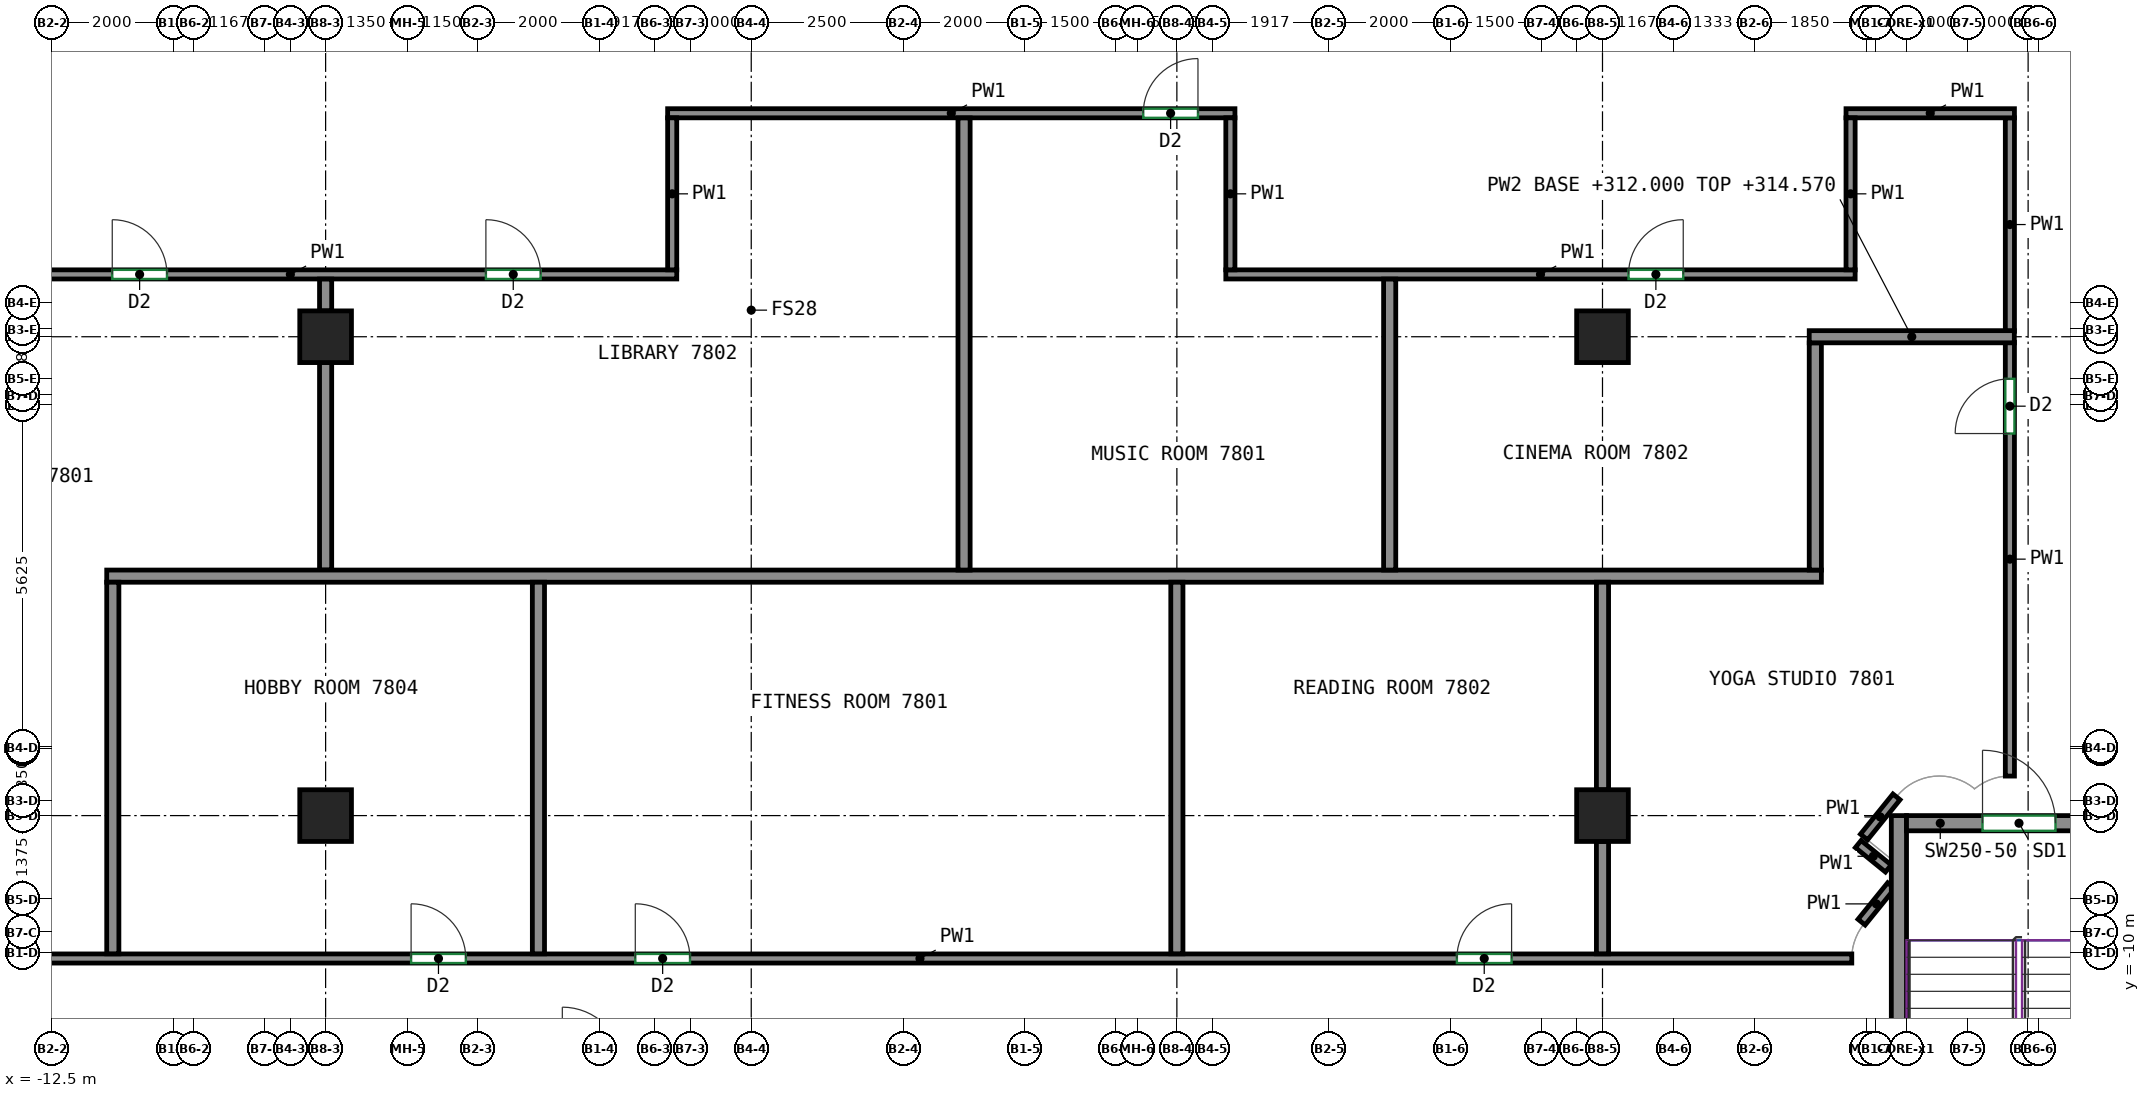
"""IFC4 building model, lengths in metres.
Left out: names, types, materials, properties, quantities, classifications, styles, units other than length and angle.
Written with IfcOpenShell. Run it as: python <this file> out.ifc"""

import sys

from ifc_helpers import new_model, si_unit, direction, frame, frame_2d, origin, origin_2d, place, context, subcontext, project, spatial, rectangle, extrude, source, transform, mapped, element, fill, save


model = new_model("IFC4")
c1 = context("Model", 3, precision=1e-05, world=origin(), true_north=direction((0.0, 1.0)))
c2 = subcontext(c1, "Body", "Model", "MODEL_VIEW")
j1 = project(units=[si_unit("LENGTHUNIT", "METRE"), si_unit("PLANEANGLEUNIT", "RADIAN")], contexts=[c1])
p1 = place(None, origin())
s1 = spatial("IfcSite", under=j1, at=p1, CompositionType="ELEMENT")
p2 = place(p1, origin())
s2 = spatial("IfcBuilding", under=s1, at=p2, CompositionType="ELEMENT")
p3 = place(p2, frame((0.0, 0.0, 312.0)))
s3 = spatial("IfcBuildingStorey", under=s2, at=p3, CompositionType="ELEMENT", Elevation=312.0)
m1 = source(origin(), c2, "Body", "SweptSolid", [
    extrude(rectangle(XDim=0.85, YDim=0.85, at=origin_2d()), origin(), (0.0, 0.0, 1.0), 3.12),
])
for number, where, z_axis, x_axis in (
    (1, (-8.0, -7.75, 0.0), (0.0, 0.0, 1.0), (1.0, 0.0, 0.0)),
    (2, (-8.0, 0.125, 0.0), (0.0, 0.0, 1.0), (1.0, 0.0, 0.0)),
    (3, (13.0, -7.75, 0.0), (0.0, 0.0, 1.0), (1.0, 0.0, 0.0)),
    (4, (13.0, 0.125, 0.0), (0.0, 0.0, 1.0), (1.0, 0.0, 0.0)),
):
    element("IfcColumn", number, at=place(p3, frame(where, z_axis=z_axis, x_axis=x_axis)), inside=s3, PredefinedType="COLUMN", context=c2, shape_type="MappedRepresentation", body=[
        mapped(m1, transform((0.0, 0.0, 0.0))),
    ])
m2 = source(origin(), c2, "Body", "SweptSolid", [
    extrude(rectangle(XDim=8.0, YDim=0.25, at=frame_2d((4.0, 0.0))), origin(), (0.0, 0.0, 1.0), 3.12),
])
p4 = place(p3, frame((17.875, -15.75, 0.0), z_axis=(0.0, 0.0, 1.0), x_axis=(0.0, 1.0, 0.0)))
e5 = element("IfcWall", 5, at=p4, inside=s3, PredefinedType="SHEAR", context=c2, shape_type="MappedRepresentation", body=[
    mapped(m2, transform((0.0, 0.0, 0.0))),
])
m3 = source(origin(), c2, "Body", "SweptSolid", [
    extrude(rectangle(XDim=3.7, YDim=0.25, at=frame_2d((1.85, 0.0))), origin(), (0.0, 0.0, 1.0), 3.12),
])
p5 = place(p3, frame((18.0, -7.875, 0.0), z_axis=(0.0, 0.0, 1.0), x_axis=(1.0, 0.0, 0.0)))
e6 = element("IfcWall", 6, at=p5, inside=s3, PredefinedType="SHEAR", context=c2, shape_type="MappedRepresentation", body=[
    mapped(m3, transform((0.0, 0.0, 0.0))),
])
p6 = place(p5, frame((1.25, 0.0, 0.0)))
e7 = element("IfcOpeningElement", 7, at=p6, cuts=e6, PredefinedType="OPENING", context=c2, shape_type="SweptSolid", body=[
    extrude(rectangle(XDim=1.2, YDim=2.1, at=frame_2d((0.6, 1.05))), frame((0.0, 0.135, 0.0), z_axis=(0.0, -1.0, 0.0), x_axis=(1.0, 0.0, 0.0)), (0.0, 0.0, 1.0), 0.27),
])
p7 = place(p3, frame((-14.935, 1.15, 0.0), z_axis=(0.0, 0.0, 1.0), x_axis=(1.0, 0.0, 0.0)))
e8 = element("IfcWall", 8, at=p7, inside=s3, PredefinedType="PARTITIONING", context=c2, shape_type="SweptSolid", body=[
    extrude(rectangle(XDim=12.71, YDim=0.15, at=frame_2d((6.355, 0.0))), origin(), (0.0, 0.0, 1.0), 3.12),
])
p8 = place(p7, frame((3.426, 0.0, 0.0)))
e9 = element("IfcOpeningElement", 9, at=p8, cuts=e8, PredefinedType="OPENING", context=c2, shape_type="SweptSolid", body=[
    extrude(rectangle(XDim=0.9, YDim=2.1, at=frame_2d((0.45, 1.05))), frame((0.0, 0.085, 0.0), z_axis=(0.0, -1.0, 0.0), x_axis=(1.0, 0.0, 0.0)), (0.0, 0.0, 1.0), 0.17),
])
p9 = place(p7, frame((9.571, 0.0, 0.0)))
e10 = element("IfcOpeningElement", 10, at=p9, cuts=e8, PredefinedType="OPENING", context=c2, shape_type="SweptSolid", body=[
    extrude(rectangle(XDim=0.9, YDim=2.1, at=frame_2d((0.45, 1.05))), frame((0.0, 0.085, 0.0), z_axis=(0.0, -1.0, 0.0), x_axis=(1.0, 0.0, 0.0)), (0.0, 0.0, 1.0), 0.17),
])
p10 = place(p3, frame((-13.55, -10.1, 0.0), z_axis=(0.0, 0.0, 1.0), x_axis=(1.0, 0.0, 0.0)))
e11 = element("IfcWall", 11, at=p10, inside=s3, PredefinedType="PARTITIONING", context=c2, shape_type="SweptSolid", body=[
    extrude(rectangle(XDim=30.65, YDim=0.15, at=frame_2d((15.325, 0.0))), origin(), (0.0, 0.0, 1.0), 3.12),
])
p11 = place(p10, frame((6.956, 0.0, 0.0)))
e12 = element("IfcOpeningElement", 12, at=p11, cuts=e11, PredefinedType="OPENING", context=c2, shape_type="SweptSolid", body=[
    extrude(rectangle(XDim=0.9, YDim=2.1, at=frame_2d((0.45, 1.05))), frame((0.0, 0.085, 0.0), z_axis=(0.0, -1.0, 0.0), x_axis=(1.0, 0.0, 0.0)), (0.0, 0.0, 1.0), 0.17),
])
p12 = place(p10, frame((10.643, 0.0, 0.0)))
e13 = element("IfcOpeningElement", 13, at=p12, cuts=e11, PredefinedType="OPENING", context=c2, shape_type="SweptSolid", body=[
    extrude(rectangle(XDim=0.9, YDim=2.1, at=frame_2d((0.45, 1.05))), frame((0.0, 0.085, 0.0), z_axis=(0.0, -1.0, 0.0), x_axis=(1.0, 0.0, 0.0)), (0.0, 0.0, 1.0), 0.17),
])
p13 = place(p10, frame((24.155, 0.0, 0.0)))
e14 = element("IfcOpeningElement", 14, at=p13, cuts=e11, PredefinedType="OPENING", context=c2, shape_type="SweptSolid", body=[
    extrude(rectangle(XDim=0.9, YDim=2.1, at=frame_2d((0.45, 1.05))), frame((0.0, 0.085, 0.0), z_axis=(0.0, -1.0, 0.0), x_axis=(1.0, 0.0, 0.0)), (0.0, 0.0, 1.0), 0.17),
])
p14 = place(p3, frame((-2.375, 3.8, 0.0), z_axis=(0.0, 0.0, 1.0), x_axis=(1.0, 0.0, 0.0)))
e15 = element("IfcWall", 15, at=p14, inside=s3, PredefinedType="PARTITIONING", context=c2, shape_type="SweptSolid", body=[
    extrude(rectangle(XDim=9.33, YDim=0.15, at=frame_2d((4.665, 0.0))), origin(), (0.0, 0.0, 1.0), 3.12),
])
p15 = place(p14, frame((7.822, 0.0, 0.0)))
e16 = element("IfcOpeningElement", 16, at=p15, cuts=e15, PredefinedType="OPENING", context=c2, shape_type="SweptSolid", body=[
    extrude(rectangle(XDim=0.9, YDim=2.1, at=frame_2d((0.45, 1.05))), frame((0.0, 0.085, 0.0), z_axis=(0.0, -1.0, 0.0), x_axis=(1.0, 0.0, 0.0)), (0.0, 0.0, 1.0), 0.17),
])
p16 = place(p3, frame((-2.3, 1.225, 0.0), z_axis=(0.0, 0.0, 1.0), x_axis=(0.0, 1.0, 0.0)))
e17 = element("IfcWall", 17, at=p16, inside=s3, PredefinedType="PARTITIONING", context=c2, shape_type="SweptSolid", body=[
    extrude(rectangle(XDim=2.5, YDim=0.15, at=frame_2d((1.25, 0.0))), origin(), (0.0, 0.0, 1.0), 3.12),
])
p17 = place(p3, frame((6.805, 1.15, 0.0), z_axis=(0.0, 0.0, 1.0), x_axis=(1.0, 0.0, 0.0)))
e18 = element("IfcWall", 18, at=p17, inside=s3, PredefinedType="PARTITIONING", context=c2, shape_type="SweptSolid", body=[
    extrude(rectangle(XDim=10.35, YDim=0.15, at=frame_2d((5.175, 0.0))), origin(), (0.0, 0.0, 1.0), 3.12),
])
p18 = place(p17, frame((6.623, 0.0, 0.0)))
e19 = element("IfcOpeningElement", 19, at=p18, cuts=e18, PredefinedType="OPENING", context=c2, shape_type="SweptSolid", body=[
    extrude(rectangle(XDim=0.9, YDim=2.1, at=frame_2d((0.45, 1.05))), frame((0.0, 0.085, 0.0), z_axis=(0.0, -1.0, 0.0), x_axis=(1.0, 0.0, 0.0)), (0.0, 0.0, 1.0), 0.17),
])
p19 = place(p3, frame((6.88, 3.725, 0.0), z_axis=(0.0, 0.0, 1.0), x_axis=(0.0, -1.0, 0.0)))
e20 = element("IfcWall", 20, at=p19, inside=s3, PredefinedType="PARTITIONING", context=c2, shape_type="SweptSolid", body=[
    extrude(rectangle(XDim=2.5, YDim=0.15, at=frame_2d((1.25, 0.0))), origin(), (0.0, 0.0, 1.0), 3.12),
])
p20 = place(p3, frame((17.748, -8.902, 0.0), z_axis=(0.0, 0.0, 1.0), x_axis=(-0.630342797145, -0.776316918589, 0.0)))
e21 = element("IfcWall", 21, at=p20, inside=s3, PredefinedType="PARTITIONING", context=c2, shape_type="SweptSolid", body=[
    extrude(rectangle(XDim=0.773, YDim=0.15, at=frame_2d((0.386, 0.0))), origin(), (0.0, 0.0, 1.0), 3.12),
])
p21 = place(p3, frame((17.206, -8.218, 0.0), z_axis=(0.0, 0.0, 1.0), x_axis=(0.776102288291, -0.630607039376, 0.0)))
e22 = element("IfcWall", 22, at=p21, inside=s3, PredefinedType="PARTITIONING", context=c2, shape_type="SweptSolid", body=[
    extrude(rectangle(XDim=0.638, YDim=0.15, at=frame_2d((0.319, 0.0))), origin(), (0.0, 0.0, 1.0), 3.12),
])
p22 = place(p3, frame((17.835, -7.442, 0.0), z_axis=(0.0, 0.0, 1.0), x_axis=(-0.628859024249, -0.777519342281, 0.0)))
e23 = element("IfcWall", 23, at=p22, inside=s3, PredefinedType="PARTITIONING", context=c2, shape_type="SweptSolid", body=[
    extrude(rectangle(XDim=0.849, YDim=0.15, at=frame_2d((0.425, 0.0))), origin(), (0.0, 0.0, 1.0), 3.12),
])
p23 = place(p3, frame((19.7, -7.1, 0.0), z_axis=(0.0, 0.0, 1.0), x_axis=(0.0, 1.0, 0.0)))
e24 = element("IfcWall", 24, at=p23, inside=s3, PredefinedType="PARTITIONING", context=c2, shape_type="SweptSolid", body=[
    extrude(rectangle(XDim=7.135, YDim=0.15, at=frame_2d((3.567, 0.0))), origin(), (0.0, 0.0, 1.0), 3.12),
])
p24 = place(p23, frame((5.633, 0.0, 0.0)))
e25 = element("IfcOpeningElement", 25, at=p24, cuts=e24, PredefinedType="OPENING", context=c2, shape_type="SweptSolid", body=[
    extrude(rectangle(XDim=0.9, YDim=2.1, at=frame_2d((0.45, 1.05))), frame((0.0, 0.085, 0.0), z_axis=(0.0, -1.0, 0.0), x_axis=(1.0, 0.0, 0.0)), (0.0, 0.0, 1.0), 0.17),
])
p25 = place(p3, frame((19.7, 0.215, 0.0), z_axis=(0.0, 0.0, 1.0), x_axis=(0.0, 1.0, 0.0)))
e26 = element("IfcWall", 26, at=p25, inside=s3, PredefinedType="PARTITIONING", context=c2, shape_type="SweptSolid", body=[
    extrude(rectangle(XDim=3.51, YDim=0.15, at=frame_2d((1.755, 0.0))), origin(), (0.0, 0.0, 1.0), 3.12),
])
p26 = place(p3, frame((17.005, 3.8, 0.0), z_axis=(0.0, 0.0, 1.0), x_axis=(1.0, 0.0, 0.0)))
e27 = element("IfcWall", 27, at=p26, inside=s3, PredefinedType="PARTITIONING", context=c2, shape_type="SweptSolid", body=[
    extrude(rectangle(XDim=2.77, YDim=0.15, at=frame_2d((1.385, 0.0))), origin(), (0.0, 0.0, 1.0), 3.12),
])
p27 = place(p3, frame((17.08, 1.225, 0.0), z_axis=(0.0, 0.0, 1.0), x_axis=(0.0, 1.0, 0.0)))
e28 = element("IfcWall", 28, at=p27, inside=s3, PredefinedType="PARTITIONING", context=c2, shape_type="SweptSolid", body=[
    extrude(rectangle(XDim=2.5, YDim=0.15, at=frame_2d((1.25, 0.0))), origin(), (0.0, 0.0, 1.0), 3.12),
])
p28 = place(p3, frame((-8.0, 0.55, 0.0), z_axis=(0.0, 0.0, 1.0), x_axis=(0.0, 1.0, 0.0)))
e29 = element("IfcWall", 29, at=p28, inside=s3, PredefinedType="PARTITIONING", context=c2, shape_type="SweptSolid", body=[
    extrude(rectangle(XDim=0.523, YDim=0.2, at=frame_2d((0.261, 0.0))), origin(), (0.0, 0.0, 1.0), 3.12),
])
p29 = place(p3, frame((-8.0, -3.712, 0.0), z_axis=(0.0, 0.0, 1.0), x_axis=(0.0, 1.0, 0.0)))
e30 = element("IfcWall", 30, at=p29, inside=s3, PredefinedType="PARTITIONING", context=c2, shape_type="SweptSolid", body=[
    extrude(rectangle(XDim=3.412, YDim=0.2, at=frame_2d((1.706, 0.0))), origin(), (0.0, 0.0, 1.0), 3.12),
])
p30 = place(p3, frame((-11.6, -3.812, 0.0), z_axis=(0.0, 0.0, 1.0), x_axis=(1.0, 0.0, 0.0)))
e31 = element("IfcWall", 31, at=p30, inside=s3, PredefinedType="PARTITIONING", context=c2, shape_type="SweptSolid", body=[
    extrude(rectangle(XDim=28.2, YDim=0.2, at=frame_2d((14.1, 0.0))), origin(), (0.0, 0.0, 1.0), 3.12),
])
p31 = place(p3, frame((-11.5, -10.023, 0.0), z_axis=(0.0, 0.0, 1.0), x_axis=(0.0, 1.0, 0.0)))
e32 = element("IfcWall", 32, at=p31, inside=s3, PredefinedType="PARTITIONING", context=c2, shape_type="SweptSolid", body=[
    extrude(rectangle(XDim=6.111, YDim=0.2, at=frame_2d((3.055, 0.0))), origin(), (0.0, 0.0, 1.0), 3.12),
])
p32 = place(p3, frame((2.5, -3.712, 0.0), z_axis=(0.0, 0.0, 1.0), x_axis=(0.0, 1.0, 0.0)))
e33 = element("IfcWall", 33, at=p32, inside=s3, PredefinedType="PARTITIONING", context=c2, shape_type="SweptSolid", body=[
    extrude(rectangle(XDim=7.435, YDim=0.2, at=frame_2d((3.717, 0.0))), origin(), (0.0, 0.0, 1.0), 3.12),
])
for number, where, z_axis, x_axis in (
    (34, (-4.5, -10.023, 0.0), (0.0, 0.0, 1.0), (0.0, 1.0, 0.0)),
    (35, (6.0, -10.023, 0.0), (0.0, 0.0, 1.0), (0.0, 1.0, 0.0)),
):
    element("IfcWall", number, at=place(p3, frame(where, z_axis=z_axis, x_axis=x_axis)), inside=s3, PredefinedType="PARTITIONING", context=c2, shape_type="SweptSolid", body=[
        extrude(rectangle(XDim=6.111, YDim=0.2, at=frame_2d((3.055, 0.0))), origin(), (0.0, 0.0, 1.0), 3.12),
    ])
p33 = place(p3, frame((9.5, -3.712, 0.0), z_axis=(0.0, 0.0, 1.0), x_axis=(0.0, 1.0, 0.0)))
e36 = element("IfcWall", 36, at=p33, inside=s3, PredefinedType="PARTITIONING", context=c2, shape_type="SweptSolid", body=[
    extrude(rectangle(XDim=4.785, YDim=0.2, at=frame_2d((2.393, 0.0))), origin(), (0.0, 0.0, 1.0), 3.12),
])
p34 = place(p3, frame((13.0, -7.325, 0.0), z_axis=(0.0, 0.0, 1.0), x_axis=(0.0, 1.0, 0.0)))
e37 = element("IfcWall", 37, at=p34, inside=s3, PredefinedType="PARTITIONING", context=c2, shape_type="SweptSolid", body=[
    extrude(rectangle(XDim=3.413, YDim=0.2, at=frame_2d((1.707, 0.0))), origin(), (0.0, 0.0, 1.0), 3.12),
])
p35 = place(p3, frame((13.0, -10.023, 0.0), z_axis=(0.0, 0.0, 1.0), x_axis=(0.0, 1.0, 0.0)))
e38 = element("IfcWall", 38, at=p35, inside=s3, PredefinedType="PARTITIONING", context=c2, shape_type="SweptSolid", body=[
    extrude(rectangle(XDim=1.848, YDim=0.2, at=frame_2d((0.924, 0.0))), origin(), (0.0, 0.0, 1.0), 3.12),
])
p36 = place(p3, frame((16.5, -3.712, 0.0), z_axis=(0.0, 0.0, 1.0), x_axis=(0.0, 1.0, 0.0)))
e39 = element("IfcWall", 39, at=p36, inside=s3, PredefinedType="PARTITIONING", context=c2, shape_type="SweptSolid", body=[
    extrude(rectangle(XDim=3.737, YDim=0.2, at=frame_2d((1.868, 0.0))), origin(), (0.0, 0.0, 1.0), 3.12),
])
p37 = place(p3, frame((19.773, 0.125, 0.0), z_axis=(0.0, 0.0, 1.0), x_axis=(-1.0, 0.0, 0.0)))
e40 = element("IfcWall", 40, at=p37, inside=s3, PredefinedType="PARTITIONING", context=c2, shape_type="SweptSolid", body=[
    extrude(rectangle(XDim=3.373, YDim=0.2, at=frame_2d((1.687, 0.0))), origin(), (0.0, 0.0, 1.0), 2.57),
])
p38 = place(p6, origin())
e41 = element("IfcDoor", 41, at=p38, inside=s3, OperationType="DOUBLE_DOOR_SINGLE_SWING", PredefinedType="DOOR", context=c2, shape_type="SweptSolid", body=[
    extrude(rectangle(XDim=1.2, YDim=2.1, at=frame_2d((0.6, 1.05))), frame((0.0, 0.025, 0.0), z_axis=(0.0, -1.0, 0.0), x_axis=(1.0, 0.0, 0.0)), (0.0, 0.0, 1.0), 0.05),
])
fill(e7, e41)
p39 = place(p11, origin())
e42 = element("IfcDoor", 42, at=p39, inside=s3, OperationType="SINGLE_SWING_LEFT", PredefinedType="DOOR", context=c2, shape_type="SweptSolid", body=[
    extrude(rectangle(XDim=0.9, YDim=2.1, at=frame_2d((0.45, 1.05))), frame((0.0, 0.025, 0.0), z_axis=(0.0, -1.0, 0.0), x_axis=(1.0, 0.0, 0.0)), (0.0, 0.0, 1.0), 0.05),
])
fill(e12, e42)
p40 = place(p12, origin())
e43 = element("IfcDoor", 43, at=p40, inside=s3, OperationType="SINGLE_SWING_LEFT", PredefinedType="DOOR", context=c2, shape_type="SweptSolid", body=[
    extrude(rectangle(XDim=0.9, YDim=2.1, at=frame_2d((0.45, 1.05))), frame((0.0, 0.025, 0.0), z_axis=(0.0, -1.0, 0.0), x_axis=(1.0, 0.0, 0.0)), (0.0, 0.0, 1.0), 0.05),
])
fill(e13, e43)
p41 = place(p13, origin())
e44 = element("IfcDoor", 44, at=p41, inside=s3, OperationType="SINGLE_SWING_RIGHT", PredefinedType="DOOR", context=c2, shape_type="SweptSolid", body=[
    extrude(rectangle(XDim=0.9, YDim=2.1, at=frame_2d((0.45, 1.05))), frame((0.0, 0.025, 0.0), z_axis=(0.0, -1.0, 0.0), x_axis=(1.0, 0.0, 0.0)), (0.0, 0.0, 1.0), 0.05),
])
fill(e14, e44)
p42 = place(p24, origin())
e45 = element("IfcDoor", 45, at=p42, inside=s3, OperationType="SINGLE_SWING_LEFT", PredefinedType="DOOR", context=c2, shape_type="SweptSolid", body=[
    extrude(rectangle(XDim=0.9, YDim=2.1, at=frame_2d((0.45, 1.05))), frame((0.0, 0.025, 0.0), z_axis=(0.0, -1.0, 0.0), x_axis=(1.0, 0.0, 0.0)), (0.0, 0.0, 1.0), 0.05),
])
fill(e25, e45)
p43 = place(p8, origin())
e46 = element("IfcDoor", 46, at=p43, inside=s3, OperationType="SINGLE_SWING_LEFT", PredefinedType="DOOR", context=c2, shape_type="SweptSolid", body=[
    extrude(rectangle(XDim=0.9, YDim=2.1, at=frame_2d((0.45, 1.05))), frame((0.0, 0.025, 0.0), z_axis=(0.0, -1.0, 0.0), x_axis=(1.0, 0.0, 0.0)), (0.0, 0.0, 1.0), 0.05),
])
fill(e9, e46)
p44 = place(p9, origin())
e47 = element("IfcDoor", 47, at=p44, inside=s3, OperationType="SINGLE_SWING_LEFT", PredefinedType="DOOR", context=c2, shape_type="SweptSolid", body=[
    extrude(rectangle(XDim=0.9, YDim=2.1, at=frame_2d((0.45, 1.05))), frame((0.0, 0.025, 0.0), z_axis=(0.0, -1.0, 0.0), x_axis=(1.0, 0.0, 0.0)), (0.0, 0.0, 1.0), 0.05),
])
fill(e10, e47)
p45 = place(p18, origin())
e48 = element("IfcDoor", 48, at=p45, inside=s3, OperationType="SINGLE_SWING_RIGHT", PredefinedType="DOOR", context=c2, shape_type="SweptSolid", body=[
    extrude(rectangle(XDim=0.9, YDim=2.1, at=frame_2d((0.45, 1.05))), frame((0.0, 0.025, 0.0), z_axis=(0.0, -1.0, 0.0), x_axis=(1.0, 0.0, 0.0)), (0.0, 0.0, 1.0), 0.05),
])
fill(e19, e48)
p46 = place(p15, origin())
e49 = element("IfcDoor", 49, at=p46, inside=s3, OperationType="SINGLE_SWING_RIGHT", PredefinedType="DOOR", context=c2, shape_type="SweptSolid", body=[
    extrude(rectangle(XDim=0.9, YDim=2.1, at=frame_2d((0.45, 1.05))), frame((0.0, 0.025, 0.0), z_axis=(0.0, -1.0, 0.0), x_axis=(1.0, 0.0, 0.0)), (0.0, 0.0, 1.0), 0.05),
])
fill(e16, e49)
save(model, sys.argv[1])
